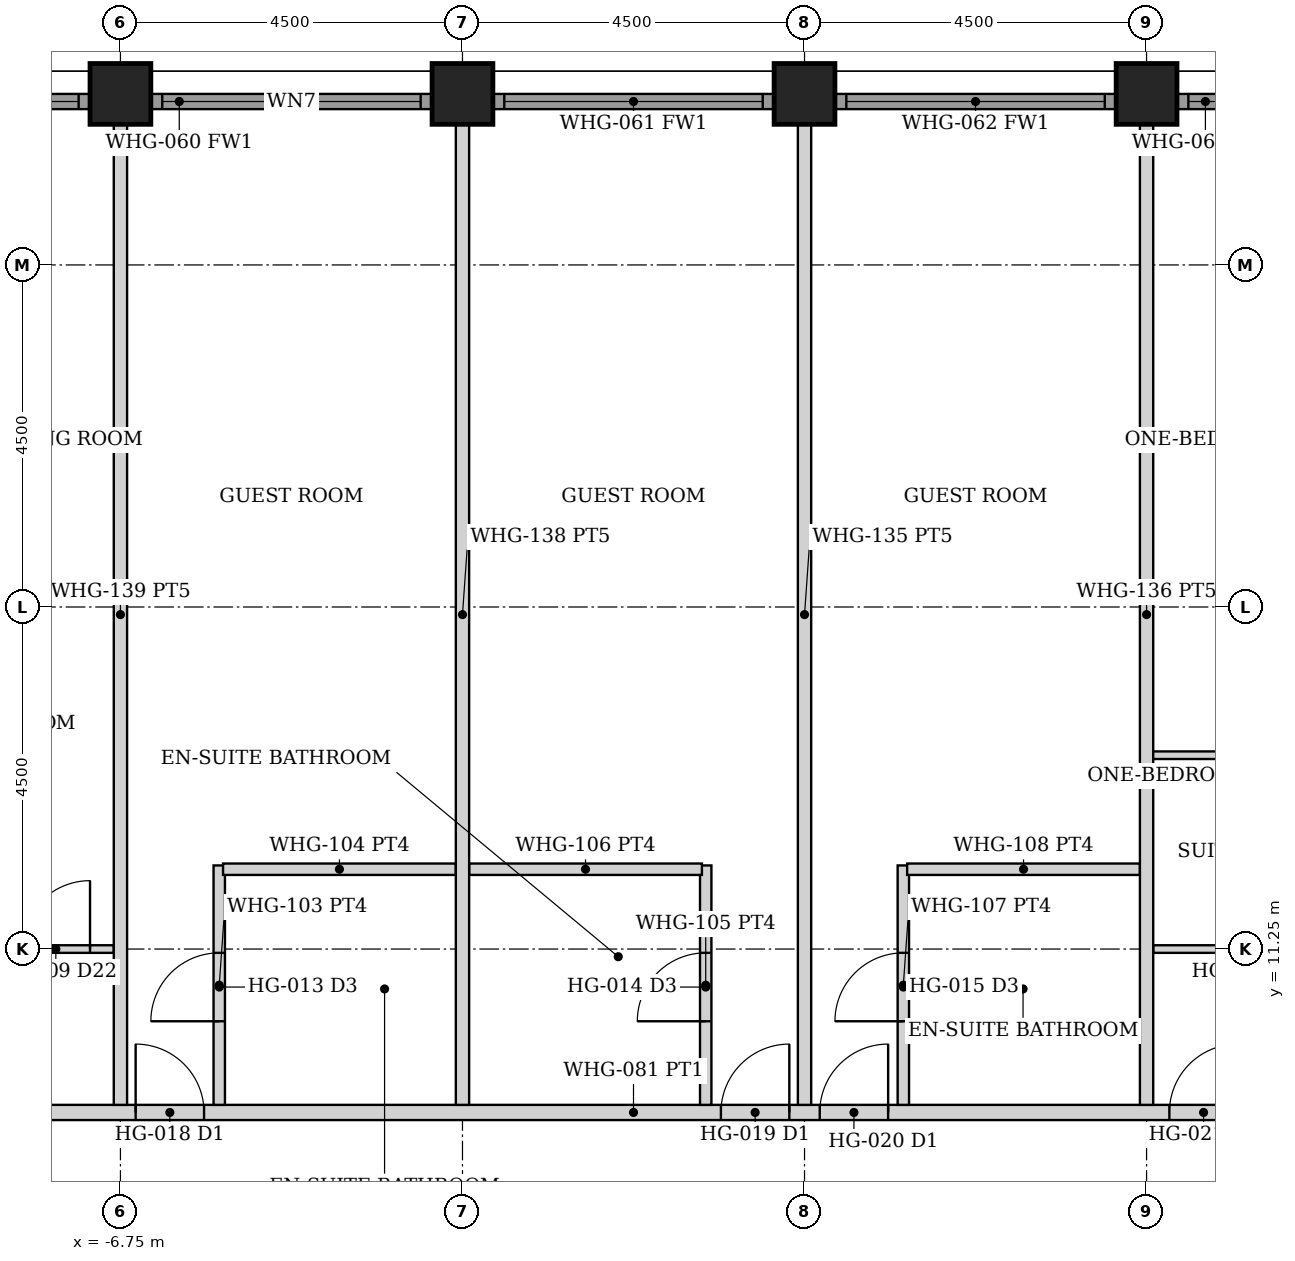
"""IFC4 building model, lengths in metres.
Left out: names, types, materials, properties, quantities, classifications, styles, units other than length and angle.
Written with IfcOpenShell. Run it as: python <this file> out.ifc"""

import sys

from ifc_helpers import new_model, si_unit, direction, frame, frame_2d, origin, origin_2d, place, context, subcontext, project, spatial, rectangle, hollow_rectangle, extrude, element, fill, save


model = new_model("IFC4")
c1 = context("Model", 3, precision=1e-05, world=origin(), true_north=direction((0.0, 1.0)))
c2 = subcontext(c1, "Body", "Model", "MODEL_VIEW")
j1 = project(units=[si_unit("LENGTHUNIT", "METRE"), si_unit("PLANEANGLEUNIT", "RADIAN")], contexts=[c1])
p1 = place(None, origin())
s1 = spatial("IfcSite", under=j1, at=p1, CompositionType="ELEMENT")
p2 = place(p1, origin())
s2 = spatial("IfcBuilding", under=s1, at=p2, CompositionType="ELEMENT")
p3 = place(p2, frame((0.0, 0.0, 186.8)))
s3 = spatial("IfcBuildingStorey", under=s2, at=p3, CompositionType="ELEMENT", Elevation=186.8)
for number, where, z_axis, x_axis in (
    (1, (-6.75, 22.5, 0.0), (0.0, 0.0, 1.0), (0.0, 1.0, 0.0)),
    (2, (-2.25, 22.5, 0.0), (0.0, 0.0, 1.0), (0.0, 1.0, 0.0)),
    (3, (2.25, 22.5, 0.0), (0.0, 0.0, 1.0), (0.0, 1.0, 0.0)),
    (4, (6.75, 22.5, 0.0), (0.0, 0.0, 1.0), (0.0, 1.0, 0.0)),
):
    element("IfcColumn", number, at=place(p3, frame(where, z_axis=z_axis, x_axis=x_axis)), inside=s3, PredefinedType="COLUMN", context=c2, shape_type="SweptSolid", body=[
        extrude(hollow_rectangle(XDim=0.8, YDim=0.8, WallThickness=0.045, at=origin_2d()), origin(), (0.0, 0.0, 1.0), 3.6),
    ])
p4 = place(p3, frame((-10.845, 22.4, 0.0), z_axis=(0.0, 0.0, 1.0), x_axis=(1.0, 0.0, 0.0)))
e5 = element("IfcWall", 5, at=p4, inside=s3, PredefinedType="SOLIDWALL", context=c2, shape_type="SweptSolid", body=[
    extrude(rectangle(XDim=3.69, YDim=0.2, at=frame_2d((1.845, 0.0))), origin(), (0.0, 0.0, 1.0), 2.379),
])
p5 = place(p4, frame((0.145, 0.0, 0.3)))
e6 = element("IfcOpeningElement", 6, at=p5, cuts=e5, PredefinedType="OPENING", context=c2, shape_type="SweptSolid", body=[
    extrude(rectangle(XDim=3.4, YDim=1.929, at=frame_2d((1.7, 0.964))), frame((0.0, 0.11, 0.0), z_axis=(0.0, -1.0, 0.0), x_axis=(1.0, 0.0, 0.0)), (0.0, 0.0, 1.0), 0.22),
])
p6 = place(p3, frame((-6.345, 22.4, 0.0), z_axis=(0.0, 0.0, 1.0), x_axis=(1.0, 0.0, 0.0)))
e7 = element("IfcWall", 7, at=p6, inside=s3, PredefinedType="SOLIDWALL", context=c2, shape_type="SweptSolid", body=[
    extrude(rectangle(XDim=3.69, YDim=0.2, at=frame_2d((1.845, 0.0))), origin(), (0.0, 0.0, 1.0), 2.379),
])
p7 = place(p6, frame((0.145, 0.0, 0.3)))
e8 = element("IfcOpeningElement", 8, at=p7, cuts=e7, PredefinedType="OPENING", context=c2, shape_type="SweptSolid", body=[
    extrude(rectangle(XDim=3.4, YDim=1.929, at=frame_2d((1.7, 0.964))), frame((0.0, 0.11, 0.0), z_axis=(0.0, -1.0, 0.0), x_axis=(1.0, 0.0, 0.0)), (0.0, 0.0, 1.0), 0.22),
])
p8 = place(p3, frame((-1.845, 22.4, 0.0), z_axis=(0.0, 0.0, 1.0), x_axis=(1.0, 0.0, 0.0)))
e9 = element("IfcWall", 9, at=p8, inside=s3, PredefinedType="SOLIDWALL", context=c2, shape_type="SweptSolid", body=[
    extrude(rectangle(XDim=3.69, YDim=0.2, at=frame_2d((1.845, 0.0))), origin(), (0.0, 0.0, 1.0), 2.379),
])
p9 = place(p8, frame((0.145, 0.0, 0.3)))
e10 = element("IfcOpeningElement", 10, at=p9, cuts=e9, PredefinedType="OPENING", context=c2, shape_type="SweptSolid", body=[
    extrude(rectangle(XDim=3.4, YDim=1.929, at=frame_2d((1.7, 0.964))), frame((0.0, 0.11, 0.0), z_axis=(0.0, -1.0, 0.0), x_axis=(1.0, 0.0, 0.0)), (0.0, 0.0, 1.0), 0.22),
])
p10 = place(p3, frame((2.655, 22.4, 0.0), z_axis=(0.0, 0.0, 1.0), x_axis=(1.0, 0.0, 0.0)))
e11 = element("IfcWall", 11, at=p10, inside=s3, PredefinedType="SOLIDWALL", context=c2, shape_type="SweptSolid", body=[
    extrude(rectangle(XDim=3.69, YDim=0.2, at=frame_2d((1.845, 0.0))), origin(), (0.0, 0.0, 1.0), 2.379),
])
p11 = place(p10, frame((0.145, 0.0, 0.3)))
e12 = element("IfcOpeningElement", 12, at=p11, cuts=e11, PredefinedType="OPENING", context=c2, shape_type="SweptSolid", body=[
    extrude(rectangle(XDim=3.4, YDim=1.929, at=frame_2d((1.7, 0.964))), frame((0.0, 0.11, 0.0), z_axis=(0.0, -1.0, 0.0), x_axis=(1.0, 0.0, 0.0)), (0.0, 0.0, 1.0), 0.22),
])
p12 = place(p3, frame((7.155, 22.4, 0.0), z_axis=(0.0, 0.0, 1.0), x_axis=(1.0, 0.0, 0.0)))
e13 = element("IfcWall", 13, at=p12, inside=s3, PredefinedType="SOLIDWALL", context=c2, shape_type="SweptSolid", body=[
    extrude(rectangle(XDim=3.69, YDim=0.2, at=frame_2d((1.845, 0.0))), origin(), (0.0, 0.0, 1.0), 2.379),
])
p13 = place(p12, frame((0.145, 0.0, 0.3)))
e14 = element("IfcOpeningElement", 14, at=p13, cuts=e13, PredefinedType="OPENING", context=c2, shape_type="SweptSolid", body=[
    extrude(rectangle(XDim=3.4, YDim=1.929, at=frame_2d((1.7, 0.964))), frame((0.0, 0.11, 0.0), z_axis=(0.0, -1.0, 0.0), x_axis=(1.0, 0.0, 0.0)), (0.0, 0.0, 1.0), 0.22),
])
p14 = place(p3, frame((-22.3, 9.1, 0.0), z_axis=(0.0, 0.0, 1.0), x_axis=(1.0, 0.0, 0.0)))
e15 = element("IfcWall", 15, at=p14, inside=s3, PredefinedType="PARTITIONING", context=c2, shape_type="SweptSolid", body=[
    extrude(rectangle(XDim=44.6, YDim=0.2, at=frame_2d((22.3, 0.0))), origin(), (0.0, 0.0, 1.0), 2.379),
])
p15 = place(p14, frame((11.35, 0.0, 0.0)))
e16 = element("IfcOpeningElement", 16, at=p15, cuts=e15, PredefinedType="OPENING", context=c2, shape_type="SweptSolid", body=[
    extrude(rectangle(XDim=0.9, YDim=2.1, at=frame_2d((0.45, 1.05))), frame((0.0, 0.11, 0.0), z_axis=(0.0, -1.0, 0.0), x_axis=(1.0, 0.0, 0.0)), (0.0, 0.0, 1.0), 0.22),
])
p16 = place(p14, frame((15.75, 0.0, 0.0)))
e17 = element("IfcOpeningElement", 17, at=p16, cuts=e15, PredefinedType="OPENING", context=c2, shape_type="SweptSolid", body=[
    extrude(rectangle(XDim=0.9, YDim=2.1, at=frame_2d((0.45, 1.05))), frame((0.0, 0.11, 0.0), z_axis=(0.0, -1.0, 0.0), x_axis=(1.0, 0.0, 0.0)), (0.0, 0.0, 1.0), 0.22),
])
p17 = place(p14, frame((23.45, 0.0, 0.0)))
e18 = element("IfcOpeningElement", 18, at=p17, cuts=e15, PredefinedType="OPENING", context=c2, shape_type="SweptSolid", body=[
    extrude(rectangle(XDim=0.9, YDim=2.1, at=frame_2d((0.45, 1.05))), frame((0.0, 0.11, 0.0), z_axis=(0.0, -1.0, 0.0), x_axis=(1.0, 0.0, 0.0)), (0.0, 0.0, 1.0), 0.22),
])
p18 = place(p14, frame((24.75, 0.0, 0.0)))
e19 = element("IfcOpeningElement", 19, at=p18, cuts=e15, PredefinedType="OPENING", context=c2, shape_type="SweptSolid", body=[
    extrude(rectangle(XDim=0.9, YDim=2.1, at=frame_2d((0.45, 1.05))), frame((0.0, 0.11, 0.0), z_axis=(0.0, -1.0, 0.0), x_axis=(1.0, 0.0, 0.0)), (0.0, 0.0, 1.0), 0.22),
])
p19 = place(p14, frame((29.35, 0.0, 0.0)))
e20 = element("IfcOpeningElement", 20, at=p19, cuts=e15, PredefinedType="OPENING", context=c2, shape_type="SweptSolid", body=[
    extrude(rectangle(XDim=0.9, YDim=2.1, at=frame_2d((0.45, 1.05))), frame((0.0, 0.11, 0.0), z_axis=(0.0, -1.0, 0.0), x_axis=(1.0, 0.0, 0.0)), (0.0, 0.0, 1.0), 0.22),
])
p20 = place(p14, frame((38.85, 0.0, 0.0)))
e21 = element("IfcOpeningElement", 21, at=p20, cuts=e15, PredefinedType="OPENING", context=c2, shape_type="SweptSolid", body=[
    extrude(rectangle(XDim=0.9, YDim=2.1, at=frame_2d((0.45, 1.05))), frame((0.0, 0.11, 0.0), z_axis=(0.0, -1.0, 0.0), x_axis=(1.0, 0.0, 0.0)), (0.0, 0.0, 1.0), 0.22),
])
p21 = place(p14, frame((4.85, 0.0, 0.0)))
e22 = element("IfcOpeningElement", 22, at=p21, cuts=e15, PredefinedType="OPENING", context=c2, shape_type="SweptSolid", body=[
    extrude(rectangle(XDim=0.9, YDim=2.1, at=frame_2d((0.45, 1.05))), frame((0.0, 0.11, 0.0), z_axis=(0.0, -1.0, 0.0), x_axis=(1.0, 0.0, 0.0)), (0.0, 0.0, 1.0), 0.22),
])
p22 = place(p3, frame((-15.663, 11.25, 0.0), z_axis=(0.0, 0.0, 1.0), x_axis=(1.0, 0.0, 0.0)))
e23 = element("IfcWall", 23, at=p22, inside=s3, PredefinedType="PARTITIONING", context=c2, shape_type="SweptSolid", body=[
    extrude(rectangle(XDim=8.825, YDim=0.1, at=frame_2d((4.413, 0.0))), origin(), (0.0, 0.0, 1.0), 2.379),
])
p23 = place(p22, frame((5.363, 0.0, 0.0)))
e24 = element("IfcOpeningElement", 24, at=p23, cuts=e23, PredefinedType="OPENING", context=c2, shape_type="SweptSolid", body=[
    extrude(rectangle(XDim=0.9, YDim=2.1, at=frame_2d((0.45, 1.05))), frame((0.0, 0.06, 0.0), z_axis=(0.0, -1.0, 0.0), x_axis=(1.0, 0.0, 0.0)), (0.0, 0.0, 1.0), 0.12),
])
p24 = place(p22, frame((7.613, 0.0, 0.0)))
e25 = element("IfcOpeningElement", 25, at=p24, cuts=e23, PredefinedType="OPENING", context=c2, shape_type="SweptSolid", body=[
    extrude(rectangle(XDim=0.9, YDim=2.1, at=frame_2d((0.45, 1.05))), frame((0.0, 0.06, 0.0), z_axis=(0.0, -1.0, 0.0), x_axis=(1.0, 0.0, 0.0)), (0.0, 0.0, 1.0), 0.12),
])
p25 = place(p22, frame((3.337, 0.0, 0.0)))
e26 = element("IfcOpeningElement", 26, at=p25, cuts=e23, PredefinedType="OPENING", context=c2, shape_type="SweptSolid", body=[
    extrude(rectangle(XDim=0.85, YDim=2.1, at=frame_2d((0.425, 1.05))), frame((0.0, 0.06, 0.0), z_axis=(0.0, -1.0, 0.0), x_axis=(1.0, 0.0, 0.0)), (0.0, 0.0, 1.0), 0.12),
])
p26 = place(p3, frame((-5.45, 9.2, 0.0), z_axis=(0.0, 0.0, 1.0), x_axis=(0.0, 1.0, 0.0)))
e27 = element("IfcWall", 27, at=p26, inside=s3, PredefinedType="PARTITIONING", context=c2, shape_type="SweptSolid", body=[
    extrude(rectangle(XDim=3.15, YDim=0.15, at=frame_2d((1.575, 0.0))), origin(), (0.0, 0.0, 1.0), 2.379),
])
p27 = place(p26, frame((1.1, 0.0, 0.0)))
e28 = element("IfcOpeningElement", 28, at=p27, cuts=e27, PredefinedType="OPENING", context=c2, shape_type="SweptSolid", body=[
    extrude(rectangle(XDim=0.9, YDim=2.1, at=frame_2d((0.45, 1.05))), frame((0.0, 0.085, 0.0), z_axis=(0.0, -1.0, 0.0), x_axis=(1.0, 0.0, 0.0)), (0.0, 0.0, 1.0), 0.17),
])
p28 = place(p3, frame((-5.4, 12.3, 0.0), z_axis=(0.0, 0.0, 1.0), x_axis=(1.0, 0.0, 0.0)))
e29 = element("IfcWall", 29, at=p28, inside=s3, PredefinedType="PARTITIONING", context=c2, shape_type="SweptSolid", body=[
    extrude(rectangle(XDim=3.062, YDim=0.15, at=frame_2d((1.531, 0.0))), origin(), (0.0, 0.0, 1.0), 2.379),
])
p29 = place(p3, frame((0.95, 9.2, 0.0), z_axis=(0.0, 0.0, 1.0), x_axis=(0.0, 1.0, 0.0)))
e30 = element("IfcWall", 30, at=p29, inside=s3, PredefinedType="PARTITIONING", context=c2, shape_type="SweptSolid", body=[
    extrude(rectangle(XDim=3.15, YDim=0.15, at=frame_2d((1.575, 0.0))), origin(), (0.0, 0.0, 1.0), 2.379),
])
p30 = place(p29, frame((1.1, 0.0, 0.0)))
e31 = element("IfcOpeningElement", 31, at=p30, cuts=e30, PredefinedType="OPENING", context=c2, shape_type="SweptSolid", body=[
    extrude(rectangle(XDim=0.9, YDim=2.1, at=frame_2d((0.45, 1.05))), frame((0.0, 0.085, 0.0), z_axis=(0.0, -1.0, 0.0), x_axis=(1.0, 0.0, 0.0)), (0.0, 0.0, 1.0), 0.17),
])
p31 = place(p3, frame((-2.163, 12.3, 0.0), z_axis=(0.0, 0.0, 1.0), x_axis=(1.0, 0.0, 0.0)))
e32 = element("IfcWall", 32, at=p31, inside=s3, PredefinedType="PARTITIONING", context=c2, shape_type="SweptSolid", body=[
    extrude(rectangle(XDim=3.062, YDim=0.15, at=frame_2d((1.531, 0.0))), origin(), (0.0, 0.0, 1.0), 2.379),
])
p32 = place(p3, frame((3.55, 9.2, 0.0), z_axis=(0.0, 0.0, 1.0), x_axis=(0.0, 1.0, 0.0)))
e33 = element("IfcWall", 33, at=p32, inside=s3, PredefinedType="PARTITIONING", context=c2, shape_type="SweptSolid", body=[
    extrude(rectangle(XDim=3.15, YDim=0.15, at=frame_2d((1.575, 0.0))), origin(), (0.0, 0.0, 1.0), 2.379),
])
p33 = place(p32, frame((1.1, 0.0, 0.0)))
e34 = element("IfcOpeningElement", 34, at=p33, cuts=e33, PredefinedType="OPENING", context=c2, shape_type="SweptSolid", body=[
    extrude(rectangle(XDim=0.9, YDim=2.1, at=frame_2d((0.45, 1.05))), frame((0.0, 0.085, 0.0), z_axis=(0.0, -1.0, 0.0), x_axis=(1.0, 0.0, 0.0)), (0.0, 0.0, 1.0), 0.17),
])
p34 = place(p3, frame((3.6, 12.3, 0.0), z_axis=(0.0, 0.0, 1.0), x_axis=(1.0, 0.0, 0.0)))
e35 = element("IfcWall", 35, at=p34, inside=s3, PredefinedType="PARTITIONING", context=c2, shape_type="SweptSolid", body=[
    extrude(rectangle(XDim=3.062, YDim=0.15, at=frame_2d((1.531, 0.0))), origin(), (0.0, 0.0, 1.0), 2.379),
])
p35 = place(p3, frame((6.837, 11.25, 0.0), z_axis=(0.0, 0.0, 1.0), x_axis=(1.0, 0.0, 0.0)))
e36 = element("IfcWall", 36, at=p35, inside=s3, PredefinedType="PARTITIONING", context=c2, shape_type="SweptSolid", body=[
    extrude(rectangle(XDim=8.825, YDim=0.1, at=frame_2d((4.413, 0.0))), origin(), (0.0, 0.0, 1.0), 2.379),
])
p36 = place(p35, frame((0.863, 0.0, 0.0)))
e37 = element("IfcOpeningElement", 37, at=p36, cuts=e36, PredefinedType="OPENING", context=c2, shape_type="SweptSolid", body=[
    extrude(rectangle(XDim=0.9, YDim=2.1, at=frame_2d((0.45, 1.05))), frame((0.0, 0.06, 0.0), z_axis=(0.0, -1.0, 0.0), x_axis=(1.0, 0.0, 0.0)), (0.0, 0.0, 1.0), 0.12),
])
p37 = place(p35, frame((3.113, 0.0, 0.0)))
e38 = element("IfcOpeningElement", 38, at=p37, cuts=e36, PredefinedType="OPENING", context=c2, shape_type="SweptSolid", body=[
    extrude(rectangle(XDim=0.9, YDim=2.1, at=frame_2d((0.45, 1.05))), frame((0.0, 0.06, 0.0), z_axis=(0.0, -1.0, 0.0), x_axis=(1.0, 0.0, 0.0)), (0.0, 0.0, 1.0), 0.12),
])
p38 = place(p35, frame((4.637, 0.0, 0.0)))
e39 = element("IfcOpeningElement", 39, at=p38, cuts=e36, PredefinedType="OPENING", context=c2, shape_type="SweptSolid", body=[
    extrude(rectangle(XDim=0.85, YDim=2.1, at=frame_2d((0.425, 1.05))), frame((0.0, 0.06, 0.0), z_axis=(0.0, -1.0, 0.0), x_axis=(1.0, 0.0, 0.0)), (0.0, 0.0, 1.0), 0.12),
])
p39 = place(p3, frame((6.81, 13.8, 0.0), z_axis=(0.0, 0.0, 1.0), x_axis=(1.0, 0.0, 0.0)))
e40 = element("IfcWall", 40, at=p39, inside=s3, PredefinedType="PARTITIONING", context=c2, shape_type="SweptSolid", body=[
    extrude(rectangle(XDim=2.74, YDim=0.1, at=frame_2d((1.37, 0.0))), origin(), (0.0, 0.0, 1.0), 2.379),
])
for number, where, z_axis, x_axis in (
    (41, (-6.75, 9.2, 0.0), (0.0, 0.0, 1.0), (0.0, 1.0, 0.0)),
    (42, (-2.25, 9.2, 0.0), (0.0, 0.0, 1.0), (0.0, 1.0, 0.0)),
    (43, (2.25, 9.2, 0.0), (0.0, 0.0, 1.0), (0.0, 1.0, 0.0)),
    (44, (6.75, 9.2, 0.0), (0.0, 0.0, 1.0), (0.0, 1.0, 0.0)),
):
    element("IfcWall", number, at=place(p3, frame(where, z_axis=z_axis, x_axis=x_axis)), inside=s3, PredefinedType="PARTITIONING", context=c2, shape_type="SweptSolid", body=[
        extrude(rectangle(XDim=12.9, YDim=0.175, at=frame_2d((6.45, 0.0))), origin(), (0.0, 0.0, 1.0), 2.379),
    ])
p40 = place(p5, origin())
e45 = element("IfcWindow", 45, at=p40, inside=s3, PartitioningType="SINGLE_PANEL", PredefinedType="WINDOW", context=c2, shape_type="SweptSolid", body=[
    extrude(rectangle(XDim=3.4, YDim=1.929, at=frame_2d((1.7, 0.964))), frame((0.0, 0.03, 0.0), z_axis=(0.0, -1.0, 0.0), x_axis=(1.0, 0.0, 0.0)), (0.0, 0.0, 1.0), 0.06),
])
fill(e6, e45)
p41 = place(p7, origin())
e46 = element("IfcWindow", 46, at=p41, inside=s3, PartitioningType="SINGLE_PANEL", PredefinedType="WINDOW", context=c2, shape_type="SweptSolid", body=[
    extrude(rectangle(XDim=3.4, YDim=1.929, at=frame_2d((1.7, 0.964))), frame((0.0, 0.03, 0.0), z_axis=(0.0, -1.0, 0.0), x_axis=(1.0, 0.0, 0.0)), (0.0, 0.0, 1.0), 0.06),
])
fill(e8, e46)
p42 = place(p9, origin())
e47 = element("IfcWindow", 47, at=p42, inside=s3, PartitioningType="SINGLE_PANEL", PredefinedType="WINDOW", context=c2, shape_type="SweptSolid", body=[
    extrude(rectangle(XDim=3.4, YDim=1.929, at=frame_2d((1.7, 0.964))), frame((0.0, 0.03, 0.0), z_axis=(0.0, -1.0, 0.0), x_axis=(1.0, 0.0, 0.0)), (0.0, 0.0, 1.0), 0.06),
])
fill(e10, e47)
p43 = place(p11, origin())
e48 = element("IfcWindow", 48, at=p43, inside=s3, PartitioningType="SINGLE_PANEL", PredefinedType="WINDOW", context=c2, shape_type="SweptSolid", body=[
    extrude(rectangle(XDim=3.4, YDim=1.929, at=frame_2d((1.7, 0.964))), frame((0.0, 0.03, 0.0), z_axis=(0.0, -1.0, 0.0), x_axis=(1.0, 0.0, 0.0)), (0.0, 0.0, 1.0), 0.06),
])
fill(e12, e48)
p44 = place(p13, origin())
e49 = element("IfcWindow", 49, at=p44, inside=s3, PartitioningType="SINGLE_PANEL", PredefinedType="WINDOW", context=c2, shape_type="SweptSolid", body=[
    extrude(rectangle(XDim=3.4, YDim=1.929, at=frame_2d((1.7, 0.964))), frame((0.0, 0.03, 0.0), z_axis=(0.0, -1.0, 0.0), x_axis=(1.0, 0.0, 0.0)), (0.0, 0.0, 1.0), 0.06),
])
fill(e14, e49)
p45 = place(p24, origin())
e50 = element("IfcDoor", 50, at=p45, inside=s3, OperationType="SINGLE_SWING_RIGHT", PredefinedType="DOOR", context=c2, shape_type="SweptSolid", body=[
    extrude(rectangle(XDim=0.9, YDim=2.1, at=frame_2d((0.45, 1.05))), frame((0.0, 0.025, 0.0), z_axis=(0.0, -1.0, 0.0), x_axis=(1.0, 0.0, 0.0)), (0.0, 0.0, 1.0), 0.05),
])
fill(e25, e50)
p46 = place(p16, origin())
e51 = element("IfcDoor", 51, at=p46, inside=s3, OperationType="SINGLE_SWING_LEFT", PredefinedType="DOOR", context=c2, shape_type="SweptSolid", body=[
    extrude(rectangle(XDim=0.9, YDim=2.1, at=frame_2d((0.45, 1.05))), frame((0.0, 0.025, 0.0), z_axis=(0.0, -1.0, 0.0), x_axis=(1.0, 0.0, 0.0)), (0.0, 0.0, 1.0), 0.05),
])
fill(e17, e51)
p47 = place(p27, origin())
e52 = element("IfcDoor", 52, at=p47, inside=s3, OperationType="SINGLE_SWING_LEFT", PredefinedType="DOOR", context=c2, shape_type="SweptSolid", body=[
    extrude(rectangle(XDim=0.9, YDim=2.1, at=frame_2d((0.45, 1.05))), frame((0.0, 0.025, 0.0), z_axis=(0.0, -1.0, 0.0), x_axis=(1.0, 0.0, 0.0)), (0.0, 0.0, 1.0), 0.05),
])
fill(e28, e52)
p48 = place(p17, origin())
e53 = element("IfcDoor", 53, at=p48, inside=s3, OperationType="SINGLE_SWING_RIGHT", PredefinedType="DOOR", context=c2, shape_type="SweptSolid", body=[
    extrude(rectangle(XDim=0.9, YDim=2.1, at=frame_2d((0.45, 1.05))), frame((0.0, 0.025, 0.0), z_axis=(0.0, -1.0, 0.0), x_axis=(1.0, 0.0, 0.0)), (0.0, 0.0, 1.0), 0.05),
])
fill(e18, e53)
p49 = place(p30, origin())
e54 = element("IfcDoor", 54, at=p49, inside=s3, OperationType="SINGLE_SWING_LEFT", PredefinedType="DOOR", context=c2, shape_type="SweptSolid", body=[
    extrude(rectangle(XDim=0.9, YDim=2.1, at=frame_2d((0.45, 1.05))), frame((0.0, 0.025, 0.0), z_axis=(0.0, -1.0, 0.0), x_axis=(1.0, 0.0, 0.0)), (0.0, 0.0, 1.0), 0.05),
])
fill(e31, e54)
p50 = place(p18, origin())
e55 = element("IfcDoor", 55, at=p50, inside=s3, OperationType="SINGLE_SWING_RIGHT", PredefinedType="DOOR", context=c2, shape_type="SweptSolid", body=[
    extrude(rectangle(XDim=0.9, YDim=2.1, at=frame_2d((0.45, 1.05))), frame((0.0, 0.025, 0.0), z_axis=(0.0, -1.0, 0.0), x_axis=(1.0, 0.0, 0.0)), (0.0, 0.0, 1.0), 0.05),
])
fill(e19, e55)
p51 = place(p33, origin())
e56 = element("IfcDoor", 56, at=p51, inside=s3, OperationType="SINGLE_SWING_LEFT", PredefinedType="DOOR", context=c2, shape_type="SweptSolid", body=[
    extrude(rectangle(XDim=0.9, YDim=2.1, at=frame_2d((0.45, 1.05))), frame((0.0, 0.025, 0.0), z_axis=(0.0, -1.0, 0.0), x_axis=(1.0, 0.0, 0.0)), (0.0, 0.0, 1.0), 0.05),
])
fill(e34, e56)
p52 = place(p19, origin())
e57 = element("IfcDoor", 57, at=p52, inside=s3, OperationType="SINGLE_SWING_RIGHT", PredefinedType="DOOR", context=c2, shape_type="SweptSolid", body=[
    extrude(rectangle(XDim=0.9, YDim=2.1, at=frame_2d((0.45, 1.05))), frame((0.0, 0.025, 0.0), z_axis=(0.0, -1.0, 0.0), x_axis=(1.0, 0.0, 0.0)), (0.0, 0.0, 1.0), 0.05),
])
fill(e20, e57)
save(model, sys.argv[1])
